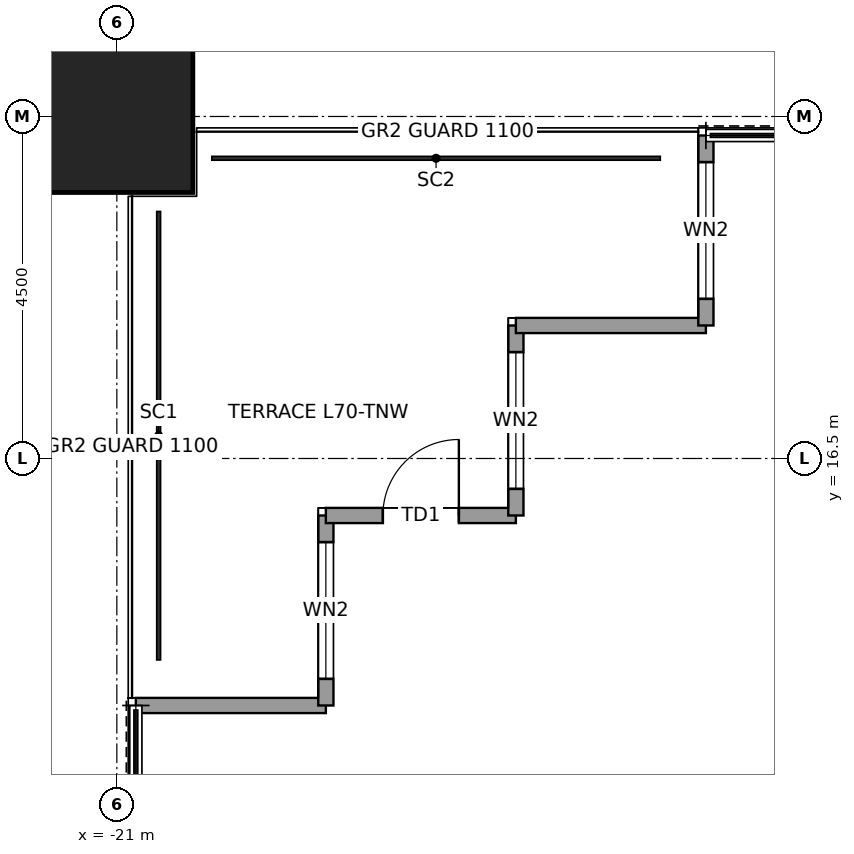
"""IFC4 building model, lengths in metres.
Left out: names, types, materials, properties, quantities, classifications, styles, units other than length and angle.
Written with IfcOpenShell. Run it as: python <this file> out.ifc"""

import sys

from ifc_helpers import new_model, si_unit, direction, frame, frame_2d, origin, origin_2d, place, context, subcontext, project, spatial, rectangle, hollow_rectangle, extrude, element, fill, save


model = new_model("IFC4")
c1 = context("Model", 3, precision=1e-05, world=origin(), true_north=direction((0.0, 1.0)))
c2 = subcontext(c1, "Body", "Model", "MODEL_VIEW")
j1 = project(units=[si_unit("LENGTHUNIT", "METRE"), si_unit("PLANEANGLEUNIT", "RADIAN")], contexts=[c1])
p1 = place(None, origin())
s1 = spatial("IfcSite", under=j1, at=p1, CompositionType="ELEMENT")
p2 = place(p1, origin())
s2 = spatial("IfcBuilding", under=s1, at=p2, CompositionType="ELEMENT")
p3 = place(p2, frame((0.0, 0.0, 315.9)))
s3 = spatial("IfcBuildingStorey", under=s2, at=p3, CompositionType="ELEMENT", Elevation=315.9)
p4 = place(p3, frame((-21.0, 21.0, 0.0), z_axis=(0.0, 0.0, 1.0), x_axis=(1.0, 0.0, 0.0)))
e1 = element("IfcColumn", 1, at=p4, inside=s3, PredefinedType="COLUMN", context=c2, shape_type="SweptSolid", body=[
    extrude(hollow_rectangle(XDim=2.0, YDim=2.0, WallThickness=0.095, at=origin_2d()), origin(), (0.0, 0.0, 1.0), 4.0),
])
p5 = place(p3, frame((-20.75, 13.25, 0.0), z_axis=(0.0, 0.0, 1.0), x_axis=(1.0, 0.0, 0.0)))
e2 = element("IfcWall", 2, at=p5, inside=s3, PredefinedType="SOLIDWALL", context=c2, shape_type="SweptSolid", body=[
    extrude(rectangle(XDim=2.5, YDim=0.2, at=frame_2d((1.25, 0.0))), origin(), (0.0, 0.0, 1.0), 3.85),
])
p6 = place(p3, frame((-18.25, 13.25, 0.0), z_axis=(0.0, 0.0, 1.0), x_axis=(0.0, 1.0, 0.0)))
e3 = element("IfcWall", 3, at=p6, inside=s3, PredefinedType="SOLIDWALL", context=c2, shape_type="SweptSolid", body=[
    extrude(rectangle(XDim=2.5, YDim=0.2, at=frame_2d((1.25, 0.0))), origin(), (0.0, 0.0, 1.0), 3.85),
])
p7 = place(p6, frame((0.35, 0.0, 0.3)))
e4 = element("IfcOpeningElement", 4, at=p7, cuts=e3, PredefinedType="OPENING", context=c2, shape_type="SweptSolid", body=[
    extrude(rectangle(XDim=1.8, YDim=2.4, at=frame_2d((0.9, 1.2))), frame((0.0, 0.11, 0.0), z_axis=(0.0, -1.0, 0.0), x_axis=(1.0, 0.0, 0.0)), (0.0, 0.0, 1.0), 0.22),
])
p8 = place(p3, frame((-18.25, 15.75, 0.0), z_axis=(0.0, 0.0, 1.0), x_axis=(1.0, 0.0, 0.0)))
e5 = element("IfcWall", 5, at=p8, inside=s3, PredefinedType="SOLIDWALL", context=c2, shape_type="SweptSolid", body=[
    extrude(rectangle(XDim=2.5, YDim=0.2, at=frame_2d((1.25, 0.0))), origin(), (0.0, 0.0, 1.0), 3.317),
])
p9 = place(p8, frame((0.75, 0.0, 0.0)))
e6 = element("IfcOpeningElement", 6, at=p9, cuts=e5, PredefinedType="OPENING", context=c2, shape_type="SweptSolid", body=[
    extrude(rectangle(XDim=1.0, YDim=2.4, at=frame_2d((0.5, 1.2))), frame((0.0, 0.11, 0.0), z_axis=(0.0, -1.0, 0.0), x_axis=(1.0, 0.0, 0.0)), (0.0, 0.0, 1.0), 0.22),
])
p10 = place(p3, frame((-15.75, 15.75, 0.0), z_axis=(0.0, 0.0, 1.0), x_axis=(0.0, 1.0, 0.0)))
e7 = element("IfcWall", 7, at=p10, inside=s3, PredefinedType="SOLIDWALL", context=c2, shape_type="SweptSolid", body=[
    extrude(rectangle(XDim=2.5, YDim=0.2, at=frame_2d((1.25, 0.0))), origin(), (0.0, 0.0, 1.0), 3.85),
])
p11 = place(p10, frame((0.35, 0.0, 0.3)))
e8 = element("IfcOpeningElement", 8, at=p11, cuts=e7, PredefinedType="OPENING", context=c2, shape_type="SweptSolid", body=[
    extrude(rectangle(XDim=1.8, YDim=2.4, at=frame_2d((0.9, 1.2))), frame((0.0, 0.11, 0.0), z_axis=(0.0, -1.0, 0.0), x_axis=(1.0, 0.0, 0.0)), (0.0, 0.0, 1.0), 0.22),
])
p12 = place(p3, frame((-15.75, 18.25, 0.0), z_axis=(0.0, 0.0, 1.0), x_axis=(1.0, 0.0, 0.0)))
e9 = element("IfcWall", 9, at=p12, inside=s3, PredefinedType="SOLIDWALL", context=c2, shape_type="SweptSolid", body=[
    extrude(rectangle(XDim=2.5, YDim=0.2, at=frame_2d((1.25, 0.0))), origin(), (0.0, 0.0, 1.0), 3.85),
])
p13 = place(p3, frame((-13.25, 18.25, 0.0), z_axis=(0.0, 0.0, 1.0), x_axis=(0.0, 1.0, 0.0)))
e10 = element("IfcWall", 10, at=p13, inside=s3, PredefinedType="SOLIDWALL", context=c2, shape_type="SweptSolid", body=[
    extrude(rectangle(XDim=2.5, YDim=0.2, at=frame_2d((1.25, 0.0))), origin(), (0.0, 0.0, 1.0), 3.85),
])
p14 = place(p13, frame((0.35, 0.0, 0.3)))
e11 = element("IfcOpeningElement", 11, at=p14, cuts=e10, PredefinedType="OPENING", context=c2, shape_type="SweptSolid", body=[
    extrude(rectangle(XDim=1.8, YDim=2.4, at=frame_2d((0.9, 1.2))), frame((0.0, 0.11, 0.0), z_axis=(0.0, -1.0, 0.0), x_axis=(1.0, 0.0, 0.0)), (0.0, 0.0, 1.0), 0.22),
])
p15 = place(p7, origin())
e12 = element("IfcWindow", 12, at=p15, inside=s3, PartitioningType="SINGLE_PANEL", PredefinedType="WINDOW", context=c2, shape_type="SweptSolid", body=[
    extrude(rectangle(XDim=1.8, YDim=2.4, at=frame_2d((0.9, 1.2))), frame((0.0, 0.03, 0.0), z_axis=(0.0, -1.0, 0.0), x_axis=(1.0, 0.0, 0.0)), (0.0, 0.0, 1.0), 0.06),
])
fill(e4, e12)
p16 = place(p9, origin())
e13 = element("IfcDoor", 13, at=p16, inside=s3, OperationType="SINGLE_SWING_RIGHT", PredefinedType="DOOR", context=c2, shape_type="SweptSolid", body=[
    extrude(rectangle(XDim=1.0, YDim=2.4, at=frame_2d((0.5, 1.2))), frame((0.0, 0.025, 0.0), z_axis=(0.0, -1.0, 0.0), x_axis=(1.0, 0.0, 0.0)), (0.0, 0.0, 1.0), 0.05),
])
fill(e6, e13)
p17 = place(p11, origin())
e14 = element("IfcWindow", 14, at=p17, inside=s3, PartitioningType="SINGLE_PANEL", PredefinedType="WINDOW", context=c2, shape_type="SweptSolid", body=[
    extrude(rectangle(XDim=1.8, YDim=2.4, at=frame_2d((0.9, 1.2))), frame((0.0, 0.03, 0.0), z_axis=(0.0, -1.0, 0.0), x_axis=(1.0, 0.0, 0.0)), (0.0, 0.0, 1.0), 0.06),
])
fill(e8, e14)
p18 = place(p14, origin())
e15 = element("IfcWindow", 15, at=p18, inside=s3, PartitioningType="SINGLE_PANEL", PredefinedType="WINDOW", context=c2, shape_type="SweptSolid", body=[
    extrude(rectangle(XDim=1.8, YDim=2.4, at=frame_2d((0.9, 1.2))), frame((0.0, 0.03, 0.0), z_axis=(0.0, -1.0, 0.0), x_axis=(1.0, 0.0, 0.0)), (0.0, 0.0, 1.0), 0.06),
])
fill(e11, e15)
save(model, sys.argv[1])
